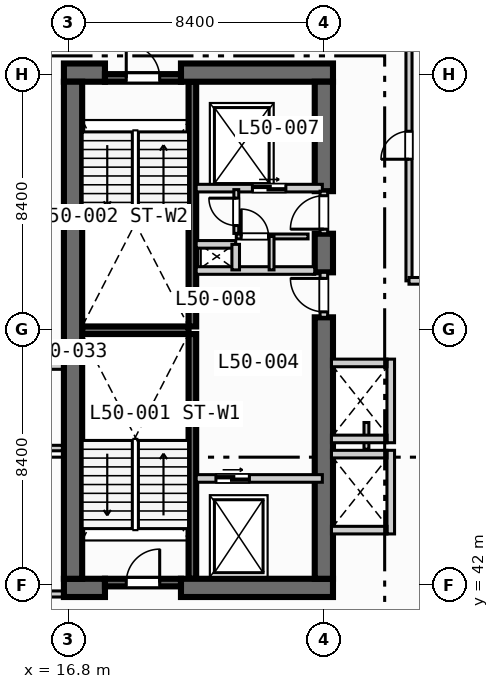
"""IFC4 building model, lengths in metres.
Left out: names, types, materials, properties, quantities, classifications, styles, units other than length and angle.
Written with IfcOpenShell. Run it as: python <this file> out.ifc"""

import sys

from ifc_helpers import new_model, si_unit, direction, frame, frame_2d, origin, place, context, subcontext, project, spatial, rectangle, extrude, element, fill, save


model = new_model("IFC4")
c1 = context("Model", 3, precision=1e-05, world=origin(), true_north=direction((0.0, 1.0)))
c2 = subcontext(c1, "Body", "Model", "MODEL_VIEW")
j1 = project(units=[si_unit("LENGTHUNIT", "METRE"), si_unit("PLANEANGLEUNIT", "RADIAN")], contexts=[c1])
p1 = place(None, origin())
s1 = spatial("IfcSite", under=j1, at=p1, CompositionType="ELEMENT")
p2 = place(p1, origin())
s2 = spatial("IfcBuilding", under=s1, at=p2, CompositionType="ELEMENT")
p3 = place(p2, frame((0.0, 0.0, 205.0)))
s3 = spatial("IfcBuildingStorey", under=s2, at=p3, CompositionType="ELEMENT", Elevation=205.0)
for number, where, z_axis, x_axis in (
    (1, (20.875, 42.2, 0.0), (0.0, 0.0, 1.0), (0.0, 1.0, 0.0)),
    (2, (20.875, 50.5, 0.0), (0.0, 0.0, 1.0), (0.0, 1.0, 0.0)),
):
    element("IfcWall", number, at=place(p3, frame(where, z_axis=z_axis, x_axis=x_axis)), inside=s3, PredefinedType="SOLIDWALL", context=c2, shape_type="SweptSolid", body=[
        extrude(rectangle(XDim=8.05, YDim=0.25, at=frame_2d((4.025, 0.0))), origin(), (0.0, 0.0, 1.0), 3.47),
    ])
p4 = place(p3, frame((17.25, 50.375, 0.0), z_axis=(0.0, 0.0, 1.0), x_axis=(1.0, 0.0, 0.0)))
e3 = element("IfcWall", 3, at=p4, inside=s3, PredefinedType="SOLIDWALL", context=c2, shape_type="SweptSolid", body=[
    extrude(rectangle(XDim=3.5, YDim=0.25, at=frame_2d((1.75, 0.0))), origin(), (0.0, 0.0, 1.0), 3.47),
])
p5 = place(p3, frame((16.65, 41.9, 0.0), z_axis=(0.0, 0.0, 1.0), x_axis=(1.0, 0.0, 0.0)))
e4 = element("IfcWall", 4, at=p5, inside=s3, PredefinedType="SHEAR", context=c2, shape_type="SweptSolid", body=[
    extrude(rectangle(XDim=1.35, YDim=0.6, at=frame_2d((0.675, 0.0))), origin(), (0.0, 0.0, 1.0), 3.47),
])
p6 = place(p3, frame((20.5, 41.9, 0.0), z_axis=(0.0, 0.0, 1.0), x_axis=(1.0, 0.0, 0.0)))
e5 = element("IfcWall", 5, at=p6, inside=s3, PredefinedType="SHEAR", context=c2, shape_type="SweptSolid", body=[
    extrude(rectangle(XDim=5.0, YDim=0.6, at=frame_2d((2.5, 0.0))), origin(), (0.0, 0.0, 1.0), 3.47),
])
p7 = place(p3, frame((16.65, 58.85, 0.0), z_axis=(0.0, 0.0, 1.0), x_axis=(1.0, 0.0, 0.0)))
e6 = element("IfcWall", 6, at=p7, inside=s3, PredefinedType="SHEAR", context=c2, shape_type="SweptSolid", body=[
    extrude(rectangle(XDim=1.35, YDim=0.6, at=frame_2d((0.675, 0.0))), origin(), (0.0, 0.0, 1.0), 3.47),
])
p8 = place(p3, frame((20.5, 58.85, 0.0), z_axis=(0.0, 0.0, 1.0), x_axis=(1.0, 0.0, 0.0)))
e7 = element("IfcWall", 7, at=p8, inside=s3, PredefinedType="SHEAR", context=c2, shape_type="SweptSolid", body=[
    extrude(rectangle(XDim=5.0, YDim=0.6, at=frame_2d((2.5, 0.0))), origin(), (0.0, 0.0, 1.0), 3.47),
])
p9 = place(p3, frame((16.95, 42.2, 0.0), z_axis=(0.0, 0.0, 1.0), x_axis=(0.0, 1.0, 0.0)))
e8 = element("IfcWall", 8, at=p9, inside=s3, PredefinedType="SHEAR", context=c2, shape_type="SweptSolid", body=[
    extrude(rectangle(XDim=16.35, YDim=0.6, at=frame_2d((8.175, 0.0))), origin(), (0.0, 0.0, 1.0), 3.47),
])
p10 = place(p3, frame((25.2, 42.2, 0.0), z_axis=(0.0, 0.0, 1.0), x_axis=(0.0, 1.0, 0.0)))
e9 = element("IfcWall", 9, at=p10, inside=s3, PredefinedType="SHEAR", context=c2, shape_type="SweptSolid", body=[
    extrude(rectangle(XDim=8.6, YDim=0.6, at=frame_2d((4.3, 0.0))), origin(), (0.0, 0.0, 1.0), 3.47),
])
p11 = place(p3, frame((25.2, 52.28, 0.0), z_axis=(0.0, 0.0, 1.0), x_axis=(0.0, 1.0, 0.0)))
e10 = element("IfcWall", 10, at=p11, inside=s3, PredefinedType="SHEAR", context=c2, shape_type="SweptSolid", body=[
    extrude(rectangle(XDim=1.27, YDim=0.6, at=frame_2d((0.635, 0.0))), origin(), (0.0, 0.0, 1.0), 3.47),
])
p12 = place(p3, frame((25.2, 54.95, 0.0), z_axis=(0.0, 0.0, 1.0), x_axis=(0.0, 1.0, 0.0)))
e11 = element("IfcWall", 11, at=p12, inside=s3, PredefinedType="SHEAR", context=c2, shape_type="SweptSolid", body=[
    extrude(rectangle(XDim=3.6, YDim=0.6, at=frame_2d((1.8, 0.0))), origin(), (0.0, 0.0, 1.0), 3.47),
])
p13 = place(p3, frame((18.0, 42.075, 0.0), z_axis=(0.0, 0.0, 1.0), x_axis=(1.0, 0.0, 0.0)))
e12 = element("IfcWall", 12, at=p13, inside=s3, PredefinedType="SOLIDWALL", context=c2, shape_type="SweptSolid", body=[
    extrude(rectangle(XDim=2.5, YDim=0.25, at=frame_2d((1.25, 0.0))), origin(), (0.0, 0.0, 1.0), 3.47),
])
p14 = place(p13, frame((0.7, 0.0, 0.0)))
e13 = element("IfcOpeningElement", 13, at=p14, cuts=e12, PredefinedType="OPENING", context=c2, shape_type="SweptSolid", body=[
    extrude(rectangle(XDim=1.1, YDim=2.15, at=frame_2d((0.55, 1.075))), frame((0.0, 0.135, 0.0), z_axis=(0.0, -1.0, 0.0), x_axis=(1.0, 0.0, 0.0)), (0.0, 0.0, 1.0), 0.27),
])
p15 = place(p3, frame((18.0, 58.675, 0.0), z_axis=(0.0, 0.0, 1.0), x_axis=(1.0, 0.0, 0.0)))
e14 = element("IfcWall", 14, at=p15, inside=s3, PredefinedType="SOLIDWALL", context=c2, shape_type="SweptSolid", body=[
    extrude(rectangle(XDim=2.5, YDim=0.25, at=frame_2d((1.25, 0.0))), origin(), (0.0, 0.0, 1.0), 3.47),
])
p16 = place(p15, frame((0.7, 0.0, 0.0)))
e15 = element("IfcOpeningElement", 15, at=p16, cuts=e14, PredefinedType="OPENING", context=c2, shape_type="SweptSolid", body=[
    extrude(rectangle(XDim=1.1, YDim=2.15, at=frame_2d((0.55, 1.075))), frame((0.0, 0.135, 0.0), z_axis=(0.0, -1.0, 0.0), x_axis=(1.0, 0.0, 0.0)), (0.0, 0.0, 1.0), 0.27),
])
p17 = place(p3, frame((21.0, 45.5, 0.0), z_axis=(0.0, 0.0, 1.0), x_axis=(1.0, 0.0, 0.0)))
e16 = element("IfcWall", 16, at=p17, inside=s3, PredefinedType="SOLIDWALL", context=c2, shape_type="SweptSolid", body=[
    extrude(rectangle(XDim=4.15, YDim=0.25, at=frame_2d((2.075, 0.0))), origin(), (0.0, 0.0, 1.0), 3.47),
])
p18 = place(p17, frame((0.65, 0.0, 0.0)))
e17 = element("IfcOpeningElement", 17, at=p18, cuts=e16, PredefinedType="OPENING", context=c2, shape_type="SweptSolid", body=[
    extrude(rectangle(XDim=1.1, YDim=2.15, at=frame_2d((0.55, 1.075))), frame((0.0, 0.135, 0.0), z_axis=(0.0, -1.0, 0.0), x_axis=(1.0, 0.0, 0.0)), (0.0, 0.0, 1.0), 0.27),
])
p19 = place(p3, frame((25.2, 50.8, 0.0), z_axis=(0.0, 0.0, 1.0), x_axis=(0.0, 1.0, 0.0)))
e18 = element("IfcWall", 18, at=p19, inside=s3, PredefinedType="SOLIDWALL", context=c2, shape_type="SweptSolid", body=[
    extrude(rectangle(XDim=1.48, YDim=0.25, at=frame_2d((0.74, 0.0))), origin(), (0.0, 0.0, 1.0), 3.47),
])
p20 = place(p19, frame((0.18, 0.0, 0.0)))
e19 = element("IfcOpeningElement", 19, at=p20, cuts=e18, PredefinedType="OPENING", context=c2, shape_type="SweptSolid", body=[
    extrude(rectangle(XDim=1.1, YDim=2.15, at=frame_2d((0.55, 1.075))), frame((0.0, 0.135, 0.0), z_axis=(0.0, -1.0, 0.0), x_axis=(1.0, 0.0, 0.0)), (0.0, 0.0, 1.0), 0.27),
])
p21 = place(p3, frame((21.0, 52.34, 0.0), z_axis=(0.0, 0.0, 1.0), x_axis=(1.0, 0.0, 0.0)))
e20 = element("IfcWall", 20, at=p21, inside=s3, PredefinedType="SOLIDWALL", context=c2, shape_type="SweptSolid", body=[
    extrude(rectangle(XDim=3.9, YDim=0.25, at=frame_2d((1.95, 0.0))), origin(), (0.0, 0.0, 1.0), 3.47),
])
p22 = place(p3, frame((21.0, 55.05, 0.0), z_axis=(0.0, 0.0, 1.0), x_axis=(1.0, 0.0, 0.0)))
e21 = element("IfcWall", 21, at=p22, inside=s3, PredefinedType="SOLIDWALL", context=c2, shape_type="SweptSolid", body=[
    extrude(rectangle(XDim=4.15, YDim=0.25, at=frame_2d((2.075, 0.0))), origin(), (0.0, 0.0, 1.0), 3.47),
])
p23 = place(p22, frame((1.85, 0.0, 0.0)))
e22 = element("IfcOpeningElement", 22, at=p23, cuts=e21, PredefinedType="OPENING", context=c2, shape_type="SweptSolid", body=[
    extrude(rectangle(XDim=1.1, YDim=2.15, at=frame_2d((0.55, 1.075))), frame((0.0, 0.135, 0.0), z_axis=(0.0, -1.0, 0.0), x_axis=(1.0, 0.0, 0.0)), (0.0, 0.0, 1.0), 0.27),
])
p24 = place(p3, frame((25.2, 53.55, 0.0), z_axis=(0.0, 0.0, 1.0), x_axis=(0.0, 1.0, 0.0)))
e23 = element("IfcWall", 23, at=p24, inside=s3, PredefinedType="SOLIDWALL", context=c2, shape_type="SweptSolid", body=[
    extrude(rectangle(XDim=1.4, YDim=0.25, at=frame_2d((0.7, 0.0))), origin(), (0.0, 0.0, 1.0), 3.47),
])
p25 = place(p24, frame((0.15, 0.0, 0.0)))
e24 = element("IfcOpeningElement", 24, at=p25, cuts=e23, PredefinedType="OPENING", context=c2, shape_type="SweptSolid", body=[
    extrude(rectangle(XDim=1.1, YDim=2.15, at=frame_2d((0.55, 1.075))), frame((0.0, 0.135, 0.0), z_axis=(0.0, -1.0, 0.0), x_axis=(1.0, 0.0, 0.0)), (0.0, 0.0, 1.0), 0.27),
])
p26 = place(p3, frame((21.0, 53.2, 0.0), z_axis=(0.0, 0.0, 1.0), x_axis=(1.0, 0.0, 0.0)))
e25 = element("IfcWall", 25, at=p26, inside=s3, PredefinedType="SOLIDWALL", context=c2, shape_type="SweptSolid", body=[
    extrude(rectangle(XDim=1.3, YDim=0.25, at=frame_2d((0.65, 0.0))), origin(), (0.0, 0.0, 1.0), 3.47),
])
p27 = place(p3, frame((22.3, 52.36, 0.0), z_axis=(0.0, 0.0, 1.0), x_axis=(0.0, 1.0, 0.0)))
e26 = element("IfcWall", 26, at=p27, inside=s3, PredefinedType="SOLIDWALL", context=c2, shape_type="SweptSolid", body=[
    extrude(rectangle(XDim=0.84, YDim=0.25, at=frame_2d((0.42, 0.0))), origin(), (0.0, 0.0, 1.0), 3.47),
])
p28 = place(p3, frame((22.32, 53.56, 0.0), z_axis=(0.0, 0.0, 1.0), x_axis=(0.0, 1.0, 0.0)))
e27 = element("IfcWall", 27, at=p28, inside=s3, PredefinedType="PARTITIONING", context=c2, shape_type="SweptSolid", body=[
    extrude(rectangle(XDim=1.44, YDim=0.16, at=frame_2d((0.72, 0.0))), origin(), (0.0, 0.0, 1.0), 3.47),
])
p29 = place(p28, frame((0.26, 0.0, 0.0)))
e28 = element("IfcOpeningElement", 28, at=p29, cuts=e27, PredefinedType="OPENING", context=c2, shape_type="SweptSolid", body=[
    extrude(rectangle(XDim=0.9, YDim=2.1, at=frame_2d((0.45, 1.05))), frame((0.0, 0.09, 0.0), z_axis=(0.0, -1.0, 0.0), x_axis=(1.0, 0.0, 0.0)), (0.0, 0.0, 1.0), 0.18),
])
p30 = place(p3, frame((22.32, 53.46, 0.0), z_axis=(0.0, 0.0, 1.0), x_axis=(1.0, 0.0, 0.0)))
e29 = element("IfcWall", 29, at=p30, inside=s3, PredefinedType="PARTITIONING", context=c2, shape_type="SweptSolid", body=[
    extrude(rectangle(XDim=2.36, YDim=0.16, at=frame_2d((1.18, 0.0))), origin(), (0.0, 0.0, 1.0), 3.47),
])
p31 = place(p30, frame((0.16, 0.0, 0.0)))
e30 = element("IfcOpeningElement", 30, at=p31, cuts=e29, PredefinedType="OPENING", context=c2, shape_type="SweptSolid", body=[
    extrude(rectangle(XDim=0.9, YDim=2.1, at=frame_2d((0.45, 1.05))), frame((0.0, 0.09, 0.0), z_axis=(0.0, -1.0, 0.0), x_axis=(1.0, 0.0, 0.0)), (0.0, 0.0, 1.0), 0.18),
])
p32 = place(p3, frame((23.48, 52.36, 0.0), z_axis=(0.0, 0.0, 1.0), x_axis=(0.0, 1.0, 0.0)))
e31 = element("IfcWall", 31, at=p32, inside=s3, PredefinedType="PARTITIONING", context=c2, shape_type="SweptSolid", body=[
    extrude(rectangle(XDim=1.1, YDim=0.16, at=frame_2d((0.55, 0.0))), origin(), (0.0, 0.0, 1.0), 3.47),
])
p33 = place(p3, frame((27.4, 43.675, 0.0), z_axis=(0.0, 0.0, 1.0), x_axis=(0.0, 1.0, 0.0)))
e32 = element("IfcWall", 32, at=p33, inside=s3, PredefinedType="SOLIDWALL", context=c2, shape_type="SweptSolid", body=[
    extrude(rectangle(XDim=2.75, YDim=0.25, at=frame_2d((1.375, 0.0))), origin(), (0.0, 0.0, 1.0), 3.47),
])
for number, where, z_axis, x_axis in (
    (33, (25.45, 43.8, 0.0), (0.0, 0.0, 1.0), (1.0, 0.0, 0.0)),
    (34, (25.45, 46.3, 0.0), (0.0, 0.0, 1.0), (1.0, 0.0, 0.0)),
):
    element("IfcWall", number, at=place(p3, frame(where, z_axis=z_axis, x_axis=x_axis)), inside=s3, PredefinedType="SOLIDWALL", context=c2, shape_type="SweptSolid", body=[
        extrude(rectangle(XDim=1.825, YDim=0.25, at=frame_2d((0.913, 0.0))), origin(), (0.0, 0.0, 1.0), 3.47),
    ])
p34 = place(p3, frame((26.6, 46.46, 0.0), z_axis=(0.0, 0.0, 1.0), x_axis=(0.0, 1.0, 0.0)))
e35 = element("IfcWall", 35, at=p34, inside=s3, PredefinedType="PARTITIONING", context=c2, shape_type="SweptSolid", body=[
    extrude(rectangle(XDim=0.88, YDim=0.16, at=frame_2d((0.44, 0.0))), origin(), (0.0, 0.0, 1.0), 3.47),
])
p35 = place(p3, frame((27.4, 46.675, 0.0), z_axis=(0.0, 0.0, 1.0), x_axis=(0.0, 1.0, 0.0)))
e36 = element("IfcWall", 36, at=p35, inside=s3, PredefinedType="SOLIDWALL", context=c2, shape_type="SweptSolid", body=[
    extrude(rectangle(XDim=2.75, YDim=0.25, at=frame_2d((1.375, 0.0))), origin(), (0.0, 0.0, 1.0), 3.47),
])
for number, where, z_axis, x_axis in (
    (37, (25.45, 46.8, 0.0), (0.0, 0.0, 1.0), (1.0, 0.0, 0.0)),
    (38, (25.45, 49.3, 0.0), (0.0, 0.0, 1.0), (1.0, 0.0, 0.0)),
):
    element("IfcWall", number, at=place(p3, frame(where, z_axis=z_axis, x_axis=x_axis)), inside=s3, PredefinedType="SOLIDWALL", context=c2, shape_type="SweptSolid", body=[
        extrude(rectangle(XDim=1.825, YDim=0.25, at=frame_2d((0.913, 0.0))), origin(), (0.0, 0.0, 1.0), 3.47),
    ])
p36 = place(p3, frame((0.35, 41.7, 0.0), z_axis=(0.0, 0.0, 1.0), x_axis=(1.0, 0.0, 0.0)))
e39 = element("IfcWall", 39, at=p36, inside=s3, PredefinedType="PARTITIONING", context=c2, shape_type="SweptSolid", body=[
    extrude(rectangle(XDim=16.25, YDim=0.2, at=frame_2d((8.125, 0.0))), origin(), (0.0, 0.0, 1.0), 2.82),
])
p37 = place(p36, frame((14.2, 0.0, 0.0)))
e40 = element("IfcOpeningElement", 40, at=p37, cuts=e39, PredefinedType="OPENING", context=c2, shape_type="SweptSolid", body=[
    extrude(rectangle(XDim=1.0, YDim=2.15, at=frame_2d((0.5, 1.075))), frame((0.0, 0.11, 0.0), z_axis=(0.0, -1.0, 0.0), x_axis=(1.0, 0.0, 0.0)), (0.0, 0.0, 1.0), 0.22),
])
p38 = place(p3, frame((0.35, 49.2, 0.0), z_axis=(0.0, 0.0, 1.0), x_axis=(1.0, 0.0, 0.0)))
e41 = element("IfcWall", 41, at=p38, inside=s3, PredefinedType="PARTITIONING", context=c2, shape_type="SweptSolid", body=[
    extrude(rectangle(XDim=16.25, YDim=0.22, at=frame_2d((8.125, 0.0))), origin(), (0.0, 0.0, 1.0), 3.47),
])
p39 = place(p3, frame((11.6, 46.5, 0.0), z_axis=(0.0, 0.0, 1.0), x_axis=(1.0, 0.0, 0.0)))
e42 = element("IfcWall", 42, at=p39, inside=s3, PredefinedType="PLUMBINGWALL", context=c2, shape_type="SweptSolid", body=[
    extrude(rectangle(XDim=5.0, YDim=0.18, at=frame_2d((2.5, 0.0))), origin(), (0.0, 0.0, 1.0), 3.47),
])
p40 = place(p39, frame((0.7, 0.0, 0.0)))
e43 = element("IfcOpeningElement", 43, at=p40, cuts=e42, PredefinedType="OPENING", context=c2, shape_type="SweptSolid", body=[
    extrude(rectangle(XDim=0.9, YDim=2.1, at=frame_2d((0.45, 1.05))), frame((0.0, 0.1, 0.0), z_axis=(0.0, -1.0, 0.0), x_axis=(1.0, 0.0, 0.0)), (0.0, 0.0, 1.0), 0.2),
])
p41 = place(p39, frame((3.15, 0.0, 0.0)))
e44 = element("IfcOpeningElement", 44, at=p41, cuts=e42, PredefinedType="OPENING", context=c2, shape_type="SweptSolid", body=[
    extrude(rectangle(XDim=0.92, YDim=2.1, at=frame_2d((0.46, 1.05))), frame((0.0, 0.1, 0.0), z_axis=(0.0, -1.0, 0.0), x_axis=(1.0, 0.0, 0.0)), (0.0, 0.0, 1.0), 0.2),
])
p42 = place(p3, frame((28.0, 52.0, 0.0), z_axis=(0.0, 0.0, 1.0), x_axis=(0.0, 1.0, 0.0)))
e45 = element("IfcWall", 45, at=p42, inside=s3, PredefinedType="PARTITIONING", context=c2, shape_type="SweptSolid", body=[
    extrude(rectangle(XDim=20.2, YDim=0.2, at=frame_2d((10.1, 0.0))), origin(), (0.0, 0.0, 1.0), 3.47),
])
p43 = place(p42, frame((4.0, 0.0, 0.0)))
e46 = element("IfcOpeningElement", 46, at=p43, cuts=e45, PredefinedType="OPENING", context=c2, shape_type="SweptSolid", body=[
    extrude(rectangle(XDim=0.92, YDim=2.1, at=frame_2d((0.46, 1.05))), frame((0.0, 0.11, 0.0), z_axis=(0.0, -1.0, 0.0), x_axis=(1.0, 0.0, 0.0)), (0.0, 0.0, 1.0), 0.22),
])
p44 = place(p3, frame((28.0, 52.0, 0.0), z_axis=(0.0, 0.0, 1.0), x_axis=(1.0, 0.0, 0.0)))
e47 = element("IfcWall", 47, at=p44, inside=s3, PredefinedType="PARTITIONING", context=c2, shape_type="SweptSolid", body=[
    extrude(rectangle(XDim=5.3, YDim=0.22, at=frame_2d((2.65, 0.0))), origin(), (0.0, 0.0, 1.0), 3.47),
])
p45 = place(p14, origin())
e48 = element("IfcDoor", 48, at=p45, inside=s3, OperationType="SINGLE_SWING_RIGHT", PredefinedType="DOOR", context=c2, shape_type="SweptSolid", body=[
    extrude(rectangle(XDim=1.1, YDim=2.15, at=frame_2d((0.55, 1.075))), frame((0.0, 0.025, 0.0), z_axis=(0.0, -1.0, 0.0), x_axis=(1.0, 0.0, 0.0)), (0.0, 0.0, 1.0), 0.05),
])
fill(e13, e48)
p46 = place(p16, origin())
e49 = element("IfcDoor", 49, at=p46, inside=s3, OperationType="SINGLE_SWING_LEFT", PredefinedType="DOOR", context=c2, shape_type="SweptSolid", body=[
    extrude(rectangle(XDim=1.1, YDim=2.15, at=frame_2d((0.55, 1.075))), frame((0.0, 0.025, 0.0), z_axis=(0.0, -1.0, 0.0), x_axis=(1.0, 0.0, 0.0)), (0.0, 0.0, 1.0), 0.05),
])
fill(e15, e49)
p47 = place(p18, origin())
e50 = element("IfcDoor", 50, at=p47, inside=s3, OperationType="SLIDING_TO_LEFT", PredefinedType="DOOR", context=c2, shape_type="SweptSolid", body=[
    extrude(rectangle(XDim=1.1, YDim=2.15, at=frame_2d((0.55, 1.075))), frame((0.0, 0.025, 0.0), z_axis=(0.0, -1.0, 0.0), x_axis=(1.0, 0.0, 0.0)), (0.0, 0.0, 1.0), 0.05),
])
fill(e17, e50)
p48 = place(p20, origin())
e51 = element("IfcDoor", 51, at=p48, inside=s3, OperationType="SINGLE_SWING_RIGHT", PredefinedType="DOOR", context=c2, shape_type="SweptSolid", body=[
    extrude(rectangle(XDim=1.1, YDim=2.15, at=frame_2d((0.55, 1.075))), frame((0.0, 0.025, 0.0), z_axis=(0.0, -1.0, 0.0), x_axis=(1.0, 0.0, 0.0)), (0.0, 0.0, 1.0), 0.05),
])
fill(e19, e51)
p49 = place(p23, origin())
e52 = element("IfcDoor", 52, at=p49, inside=s3, OperationType="SLIDING_TO_LEFT", PredefinedType="DOOR", context=c2, shape_type="SweptSolid", body=[
    extrude(rectangle(XDim=1.1, YDim=2.15, at=frame_2d((0.55, 1.075))), frame((0.0, 0.025, 0.0), z_axis=(0.0, -1.0, 0.0), x_axis=(1.0, 0.0, 0.0)), (0.0, 0.0, 1.0), 0.05),
])
fill(e22, e52)
p50 = place(p25, origin())
e53 = element("IfcDoor", 53, at=p50, inside=s3, OperationType="SINGLE_SWING_LEFT", PredefinedType="DOOR", context=c2, shape_type="SweptSolid", body=[
    extrude(rectangle(XDim=1.1, YDim=2.15, at=frame_2d((0.55, 1.075))), frame((0.0, 0.025, 0.0), z_axis=(0.0, -1.0, 0.0), x_axis=(1.0, 0.0, 0.0)), (0.0, 0.0, 1.0), 0.05),
])
fill(e24, e53)
p51 = place(p29, origin())
e54 = element("IfcDoor", 54, at=p51, inside=s3, OperationType="SINGLE_SWING_RIGHT", PredefinedType="DOOR", context=c2, shape_type="SweptSolid", body=[
    extrude(rectangle(XDim=0.9, YDim=2.1, at=frame_2d((0.45, 1.05))), frame((0.0, 0.025, 0.0), z_axis=(0.0, -1.0, 0.0), x_axis=(1.0, 0.0, 0.0)), (0.0, 0.0, 1.0), 0.05),
])
fill(e28, e54)
p52 = place(p31, origin())
e55 = element("IfcDoor", 55, at=p52, inside=s3, OperationType="SINGLE_SWING_LEFT", PredefinedType="DOOR", context=c2, shape_type="SweptSolid", body=[
    extrude(rectangle(XDim=0.9, YDim=2.1, at=frame_2d((0.45, 1.05))), frame((0.0, 0.025, 0.0), z_axis=(0.0, -1.0, 0.0), x_axis=(1.0, 0.0, 0.0)), (0.0, 0.0, 1.0), 0.05),
])
fill(e30, e55)
p53 = place(p43, origin())
e56 = element("IfcDoor", 56, at=p53, inside=s3, OperationType="SINGLE_SWING_LEFT", PredefinedType="DOOR", context=c2, shape_type="SweptSolid", body=[
    extrude(rectangle(XDim=0.92, YDim=2.1, at=frame_2d((0.46, 1.05))), frame((0.0, 0.025, 0.0), z_axis=(0.0, -1.0, 0.0), x_axis=(1.0, 0.0, 0.0)), (0.0, 0.0, 1.0), 0.05),
])
fill(e46, e56)
save(model, sys.argv[1])
